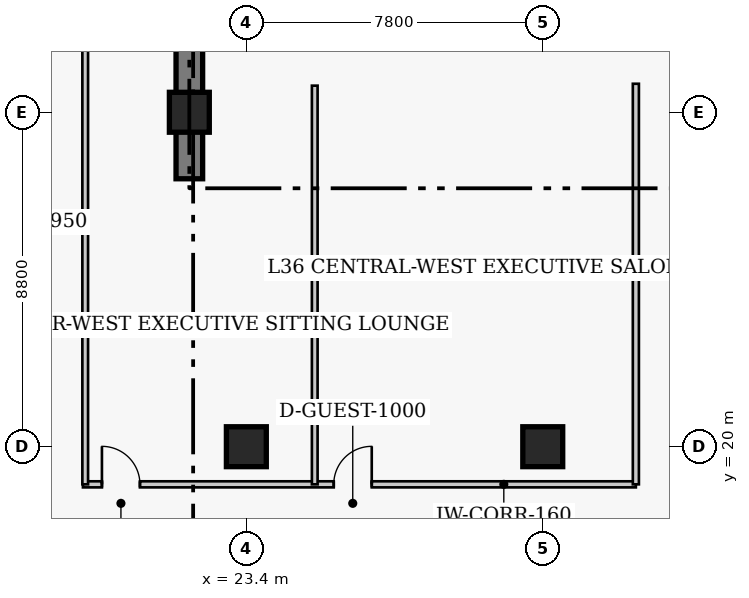
"""IFC4 building model, lengths in metres.
Left out: names, types, materials, properties, quantities, classifications, styles, units other than length and angle.
Written with IfcOpenShell. Run it as: python <this file> out.ifc"""

import sys

from ifc_helpers import new_model, si_unit, direction, frame, frame_2d, origin, origin_2d, place, context, subcontext, project, spatial, rectangle, extrude, element, fill, save


model = new_model("IFC4")
c1 = context("Model", 3, precision=1e-05, world=origin(), true_north=direction((0.0, 1.0)))
c2 = subcontext(c1, "Body", "Model", "MODEL_VIEW")
j1 = project(units=[si_unit("LENGTHUNIT", "METRE"), si_unit("PLANEANGLEUNIT", "RADIAN")], contexts=[c1])
p1 = place(None, origin())
s1 = spatial("IfcSite", under=j1, at=p1, CompositionType="ELEMENT")
p2 = place(p1, origin())
s2 = spatial("IfcBuilding", under=s1, at=p2, CompositionType="ELEMENT")
p3 = place(p2, frame((0.0, 0.0, 146.0)))
s3 = spatial("IfcBuildingStorey", under=s2, at=p3, CompositionType="ELEMENT", Elevation=146.0)
p4 = place(p3, frame((21.9, 27.05, 0.0), z_axis=(0.0, 0.0, 1.0), x_axis=(0.0, 1.0, 0.0)))
e1 = element("IfcWall", 1, at=p4, inside=s3, PredefinedType="SHEAR", context=c2, shape_type="SweptSolid", body=[
    extrude(rectangle(XDim=13.62, YDim=0.7, at=frame_2d((6.81, 0.0))), origin(), (0.0, 0.0, 1.0), 3.8),
])
for number, where, z_axis, x_axis in (
    (2, (23.4, 20.0, 0.0), (0.0, 0.0, 1.0), (1.0, 0.0, 0.0)),
    (3, (31.2, 20.0, 0.0), (0.0, 0.0, 1.0), (1.0, 0.0, 0.0)),
    (4, (21.9, 28.8, 0.0), (0.0, 0.0, 1.0), (1.0, 0.0, 0.0)),
):
    element("IfcColumn", number, at=place(p3, frame(where, z_axis=z_axis, x_axis=x_axis)), inside=s3, PredefinedType="COLUMN", context=c2, shape_type="SweptSolid", body=[
        extrude(rectangle(XDim=1.05, YDim=1.05, at=origin_2d()), origin(), (0.0, 0.0, 1.0), 3.8),
    ])
p5 = place(p3, frame((19.1, 19.01, 0.0), z_axis=(0.0, 0.0, 1.0), x_axis=(1.0, 0.0, 0.0)))
e5 = element("IfcWall", 5, at=p5, inside=s3, PredefinedType="PARTITIONING", context=c2, shape_type="SweptSolid", body=[
    extrude(rectangle(XDim=14.55, YDim=0.16, at=frame_2d((7.275, 0.0))), origin(), (0.0, 0.0, 1.0), 3.55),
])
p6 = place(p5, frame((0.5, 0.0, 0.0)))
e6 = element("IfcOpeningElement", 6, at=p6, cuts=e5, PredefinedType="OPENING", context=c2, shape_type="SweptSolid", body=[
    extrude(rectangle(XDim=1.0, YDim=2.15, at=frame_2d((0.5, 1.075))), frame((0.0, 0.09, 0.0), z_axis=(0.0, -1.0, 0.0), x_axis=(1.0, 0.0, 0.0)), (0.0, 0.0, 1.0), 0.18),
])
p7 = place(p5, frame((6.6, 0.0, 0.0)))
e7 = element("IfcOpeningElement", 7, at=p7, cuts=e5, PredefinedType="OPENING", context=c2, shape_type="SweptSolid", body=[
    extrude(rectangle(XDim=1.0, YDim=2.15, at=frame_2d((0.5, 1.075))), frame((0.0, 0.09, 0.0), z_axis=(0.0, -1.0, 0.0), x_axis=(1.0, 0.0, 0.0)), (0.0, 0.0, 1.0), 0.18),
])
p8 = place(p3, frame((33.65, 19.01, 0.0), z_axis=(0.0, 0.0, 1.0), x_axis=(0.0, 1.0, 0.0)))
e8 = element("IfcWall", 8, at=p8, inside=s3, PredefinedType="PARTITIONING", context=c2, shape_type="SweptSolid", body=[
    extrude(rectangle(XDim=10.54, YDim=0.16, at=frame_2d((5.27, 0.0))), origin(), (0.0, 0.0, 1.0), 3.55),
])
p9 = place(p3, frame((19.16, 19.01, 0.0), z_axis=(0.0, 0.0, 1.0), x_axis=(0.0, 1.0, 0.0)))
e9 = element("IfcWall", 9, at=p9, inside=s3, PredefinedType="PARTITIONING", context=c2, shape_type="SweptSolid", body=[
    extrude(rectangle(XDim=13.79, YDim=0.15, at=frame_2d((6.895, 0.0))), origin(), (0.0, 0.0, 1.0), 3.55),
])
p10 = place(p3, frame((25.2, 19.01, 0.0), z_axis=(0.0, 0.0, 1.0), x_axis=(0.0, 1.0, 0.0)))
e10 = element("IfcWall", 10, at=p10, inside=s3, PredefinedType="PARTITIONING", context=c2, shape_type="SweptSolid", body=[
    extrude(rectangle(XDim=10.49, YDim=0.15, at=frame_2d((5.245, 0.0))), origin(), (0.0, 0.0, 1.0), 3.55),
])
p11 = place(p6, origin())
e11 = element("IfcDoor", 11, at=p11, inside=s3, OperationType="SINGLE_SWING_LEFT", PredefinedType="DOOR", context=c2, shape_type="SweptSolid", body=[
    extrude(rectangle(XDim=1.0, YDim=2.15, at=frame_2d((0.5, 1.075))), frame((0.0, 0.025, 0.0), z_axis=(0.0, -1.0, 0.0), x_axis=(1.0, 0.0, 0.0)), (0.0, 0.0, 1.0), 0.05),
])
fill(e6, e11)
p12 = place(p7, origin())
e12 = element("IfcDoor", 12, at=p12, inside=s3, OperationType="SINGLE_SWING_RIGHT", PredefinedType="DOOR", context=c2, shape_type="SweptSolid", body=[
    extrude(rectangle(XDim=1.0, YDim=2.15, at=frame_2d((0.5, 1.075))), frame((0.0, 0.025, 0.0), z_axis=(0.0, -1.0, 0.0), x_axis=(1.0, 0.0, 0.0)), (0.0, 0.0, 1.0), 0.05),
])
fill(e7, e12)
save(model, sys.argv[1])
